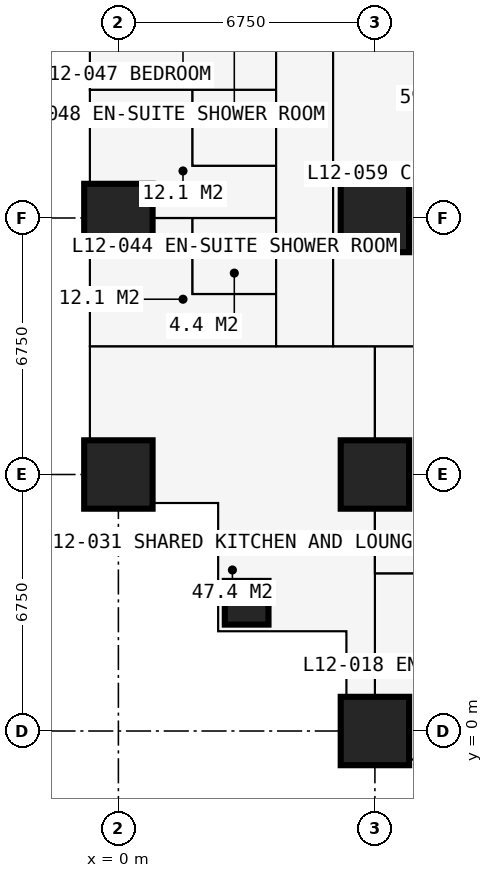
"""IFC4 building model, lengths in metres.
Left out: names, types, materials, properties, quantities, classifications, styles, units other than length and angle.
Written with IfcOpenShell. Run it as: python <this file> out.ifc"""

import sys

from ifc_helpers import new_model, si_unit, direction, frame, frame_2d, origin, origin_2d, place, context, subcontext, project, spatial, rectangle, extrude, element, fill, save


model = new_model("IFC4")
c1 = context("Model", 3, precision=1e-05, world=origin(), true_north=direction((0.0, 1.0)))
c2 = subcontext(c1, "Body", "Model", "MODEL_VIEW")
j1 = project(units=[si_unit("LENGTHUNIT", "METRE"), si_unit("PLANEANGLEUNIT", "RADIAN")], contexts=[c1])
p1 = place(None, origin())
s1 = spatial("IfcSite", under=j1, at=p1, CompositionType="ELEMENT")
p2 = place(p1, origin())
s2 = spatial("IfcBuilding", under=s1, at=p2, CompositionType="ELEMENT")
p3 = place(p2, frame((0.0, 0.0, 46.8)))
s3 = spatial("IfcBuildingStorey", under=s2, at=p3, CompositionType="ELEMENT", Elevation=46.8)
for number, where, z_axis, x_axis in (
    (1, (0.0, 6.75, 0.0), (0.0, 0.0, 1.0), (1.0, 0.0, 0.0)),
    (2, (0.0, 13.5, 0.0), (0.0, 0.0, 1.0), (1.0, 0.0, 0.0)),
):
    element("IfcColumn", number, at=place(p3, frame(where, z_axis=z_axis, x_axis=x_axis)), inside=s3, PredefinedType="COLUMN", context=c2, shape_type="SweptSolid", body=[
        extrude(rectangle(XDim=1.8, YDim=1.8, at=origin_2d()), origin(), (0.0, 0.0, 1.0), 3.6),
    ])
p4 = place(p3, frame((3.375, 3.375, 0.0), z_axis=(0.0, 0.0, 1.0), x_axis=(1.0, 0.0, 0.0)))
e3 = element("IfcColumn", 3, at=p4, inside=s3, PredefinedType="COLUMN", context=c2, shape_type="SweptSolid", body=[
    extrude(rectangle(XDim=1.15, YDim=1.15, at=origin_2d()), origin(), (0.0, 0.0, 1.0), 3.6),
])
for number, where, z_axis, x_axis in (
    (4, (6.75, 0.0, 0.0), (0.0, 0.0, 1.0), (1.0, 0.0, 0.0)),
    (5, (6.75, 6.75, 0.0), (0.0, 0.0, 1.0), (1.0, 0.0, 0.0)),
    (6, (6.75, 13.5, 0.0), (0.0, 0.0, 1.0), (1.0, 0.0, 0.0)),
):
    element("IfcColumn", number, at=place(p3, frame(where, z_axis=z_axis, x_axis=x_axis)), inside=s3, PredefinedType="COLUMN", context=c2, shape_type="SweptSolid", body=[
        extrude(rectangle(XDim=1.8, YDim=1.8, at=origin_2d()), origin(), (0.0, 0.0, 1.0), 3.6),
    ])
p5 = place(p3, frame((-0.75, 13.5, 0.0), z_axis=(0.0, 0.0, 1.0), x_axis=(0.0, 1.0, 0.0)))
e7 = element("IfcWall", 7, at=p5, inside=s3, PredefinedType="SOLIDWALL", context=c2, shape_type="SweptSolid", body=[
    extrude(rectangle(XDim=6.75, YDim=0.15, at=frame_2d((3.375, 0.0))), origin(), (0.0, 0.0, 1.0), 3.375),
])
p6 = place(p5, frame((0.962, 0.0, 0.0)))
e8 = element("IfcOpeningElement", 8, at=p6, cuts=e7, PredefinedType="OPENING", context=c2, shape_type="SweptSolid", body=[
    extrude(rectangle(XDim=1.0, YDim=2.2, at=frame_2d((0.5, 1.1))), frame((0.0, 0.085, 0.0), z_axis=(0.0, -1.0, 0.0), x_axis=(1.0, 0.0, 0.0)), (0.0, 0.0, 1.0), 0.17),
])
p7 = place(p5, frame((2.025, 0.0, 0.9)))
e9 = element("IfcOpeningElement", 9, at=p7, cuts=e7, PredefinedType="OPENING", context=c2, shape_type="SweptSolid", body=[
    extrude(rectangle(XDim=1.2, YDim=1.8, at=frame_2d((0.6, 0.9))), frame((0.0, 0.085, 0.0), z_axis=(0.0, -1.0, 0.0), x_axis=(1.0, 0.0, 0.0)), (0.0, 0.0, 1.0), 0.17),
])
p8 = place(p5, frame((4.788, 0.0, 0.0)))
e10 = element("IfcOpeningElement", 10, at=p8, cuts=e7, PredefinedType="OPENING", context=c2, shape_type="SweptSolid", body=[
    extrude(rectangle(XDim=1.0, YDim=2.2, at=frame_2d((0.5, 1.1))), frame((0.0, 0.085, 0.0), z_axis=(0.0, -1.0, 0.0), x_axis=(1.0, 0.0, 0.0)), (0.0, 0.0, 1.0), 0.17),
])
p9 = place(p5, frame((3.525, 0.0, 0.9)))
e11 = element("IfcOpeningElement", 11, at=p9, cuts=e7, PredefinedType="OPENING", context=c2, shape_type="SweptSolid", body=[
    extrude(rectangle(XDim=1.2, YDim=1.8, at=frame_2d((0.6, 0.9))), frame((0.0, 0.085, 0.0), z_axis=(0.0, -1.0, 0.0), x_axis=(1.0, 0.0, 0.0)), (0.0, 0.0, 1.0), 0.17),
])
p10 = place(p3, frame((-0.75, 6.0, 0.0), z_axis=(0.0, 0.0, 1.0), x_axis=(1.0, 0.0, 0.0)))
e12 = element("IfcWall", 12, at=p10, inside=s3, PredefinedType="SOLIDWALL", context=c2, shape_type="SweptSolid", body=[
    extrude(rectangle(XDim=3.375, YDim=0.3, at=frame_2d((1.688, 0.0))), origin(), (0.0, 0.0, 1.0), 3.375),
])
p11 = place(p10, frame((1.833, 0.0, 0.9)))
e13 = element("IfcOpeningElement", 13, at=p11, cuts=e12, PredefinedType="OPENING", context=c2, shape_type="SweptSolid", body=[
    extrude(rectangle(XDim=1.2, YDim=1.8, at=frame_2d((0.6, 0.9))), frame((0.0, 0.16, 0.0), z_axis=(0.0, -1.0, 0.0), x_axis=(1.0, 0.0, 0.0)), (0.0, 0.0, 1.0), 0.32),
])
p12 = place(p3, frame((2.625, 6.0, 0.0), z_axis=(0.0, 0.0, 1.0), x_axis=(0.0, -1.0, 0.0)))
e14 = element("IfcWall", 14, at=p12, inside=s3, PredefinedType="SOLIDWALL", context=c2, shape_type="SweptSolid", body=[
    extrude(rectangle(XDim=3.375, YDim=0.3, at=frame_2d((1.688, 0.0))), origin(), (0.0, 0.0, 1.0), 3.375),
])
p13 = place(p12, frame((0.788, 0.0, 0.6)))
e15 = element("IfcOpeningElement", 15, at=p13, cuts=e14, PredefinedType="OPENING", context=c2, shape_type="SweptSolid", body=[
    extrude(rectangle(XDim=1.8, YDim=2.1, at=frame_2d((0.9, 1.05))), frame((0.0, 0.16, 0.0), z_axis=(0.0, -1.0, 0.0), x_axis=(1.0, 0.0, 0.0)), (0.0, 0.0, 1.0), 0.32),
])
p14 = place(p3, frame((2.625, 2.625, 0.0), z_axis=(0.0, 0.0, 1.0), x_axis=(1.0, 0.0, 0.0)))
e16 = element("IfcWall", 16, at=p14, inside=s3, PredefinedType="SOLIDWALL", context=c2, shape_type="SweptSolid", body=[
    extrude(rectangle(XDim=3.375, YDim=0.3, at=frame_2d((1.688, 0.0))), origin(), (0.0, 0.0, 1.0), 3.375),
])
p15 = place(p14, frame((0.788, 0.0, 0.6)))
e17 = element("IfcOpeningElement", 17, at=p15, cuts=e16, PredefinedType="OPENING", context=c2, shape_type="SweptSolid", body=[
    extrude(rectangle(XDim=1.8, YDim=2.1, at=frame_2d((0.9, 1.05))), frame((0.0, 0.16, 0.0), z_axis=(0.0, -1.0, 0.0), x_axis=(1.0, 0.0, 0.0)), (0.0, 0.0, 1.0), 0.32),
])
p16 = place(p3, frame((6.0, 2.625, 0.0), z_axis=(0.0, 0.0, 1.0), x_axis=(0.0, -1.0, 0.0)))
e18 = element("IfcWall", 18, at=p16, inside=s3, PredefinedType="SOLIDWALL", context=c2, shape_type="SweptSolid", body=[
    extrude(rectangle(XDim=3.375, YDim=0.3, at=frame_2d((1.688, 0.0))), origin(), (0.0, 0.0, 1.0), 3.375),
])
p17 = place(p16, frame((0.343, 0.0, 0.9)))
e19 = element("IfcOpeningElement", 19, at=p17, cuts=e18, PredefinedType="OPENING", context=c2, shape_type="SweptSolid", body=[
    extrude(rectangle(XDim=1.2, YDim=1.8, at=frame_2d((0.6, 0.9))), frame((0.0, 0.16, 0.0), z_axis=(0.0, -1.0, 0.0), x_axis=(1.0, 0.0, 0.0)), (0.0, 0.0, 1.0), 0.32),
])
p18 = place(p3, frame((-0.85, 16.875, 0.0), z_axis=(0.0, 0.0, 1.0), x_axis=(-1.0, 0.0, 0.0)))
e20 = element("IfcWall", 20, at=p18, inside=s3, PredefinedType="USERDEFINED", context=c2, shape_type="SweptSolid", body=[
    extrude(rectangle(XDim=2.2, YDim=1.0, at=frame_2d((1.1, 0.0))), origin(), (0.0, 0.0, 1.0), 0.9),
])
p19 = place(p3, frame((-0.734, 10.125, 0.0), z_axis=(0.0, 0.0, 1.0), x_axis=(1.0, 0.0, 0.0)))
e21 = element("IfcWall", 21, at=p19, inside=s3, PredefinedType="PARTITIONING", context=c2, shape_type="SweptSolid", body=[
    extrude(rectangle(XDim=10.859, YDim=0.15, at=frame_2d((5.429, 0.0))), origin(), (0.0, 0.0, 1.0), 3.375),
])
p20 = place(p19, frame((5.134, 0.0, 0.0)))
e22 = element("IfcOpeningElement", 22, at=p20, cuts=e21, PredefinedType="OPENING", context=c2, shape_type="SweptSolid", body=[
    extrude(rectangle(XDim=1.0, YDim=2.2, at=frame_2d((0.5, 1.1))), frame((0.0, 0.085, 0.0), z_axis=(0.0, -1.0, 0.0), x_axis=(1.0, 0.0, 0.0)), (0.0, 0.0, 1.0), 0.17),
])
p21 = place(p19, frame((8.234, 0.0, 0.0)))
e23 = element("IfcOpeningElement", 23, at=p21, cuts=e21, PredefinedType="OPENING", context=c2, shape_type="SweptSolid", body=[
    extrude(rectangle(XDim=0.95, YDim=2.2, at=frame_2d((0.475, 1.1))), frame((0.0, 0.085, 0.0), z_axis=(0.0, -1.0, 0.0), x_axis=(1.0, 0.0, 0.0)), (0.0, 0.0, 1.0), 0.17),
])
p22 = place(p3, frame((-0.734, 13.5, 0.0), z_axis=(0.0, 0.0, 1.0), x_axis=(1.0, 0.0, 0.0)))
e24 = element("IfcWall", 24, at=p22, inside=s3, PredefinedType="PARTITIONING", context=c2, shape_type="SweptSolid", body=[
    extrude(rectangle(XDim=4.884, YDim=0.175, at=frame_2d((2.442, 0.0))), origin(), (0.0, 0.0, 1.0), 2.877),
])
p23 = place(p3, frame((-0.734, 16.875, 0.0), z_axis=(0.0, 0.0, 1.0), x_axis=(1.0, 0.0, 0.0)))
e25 = element("IfcWall", 25, at=p23, inside=s3, PredefinedType="PARTITIONING", context=c2, shape_type="SweptSolid", body=[
    extrude(rectangle(XDim=4.884, YDim=0.175, at=frame_2d((2.442, 0.0))), origin(), (0.0, 0.0, 1.0), 3.375),
])
p24 = place(p3, frame((1.95, 11.5, 0.0), z_axis=(0.0, 0.0, 1.0), x_axis=(0.0, 1.0, 0.0)))
e26 = element("IfcWall", 26, at=p24, inside=s3, PredefinedType="PARTITIONING", context=c2, shape_type="SweptSolid", body=[
    extrude(rectangle(XDim=2.0, YDim=0.1, at=frame_2d((1.0, 0.0))), origin(), (0.0, 0.0, 1.0), 3.375),
])
p25 = place(p3, frame((1.95, 11.5, 0.0), z_axis=(0.0, 0.0, 1.0), x_axis=(1.0, 0.0, 0.0)))
e27 = element("IfcWall", 27, at=p25, inside=s3, PredefinedType="PARTITIONING", context=c2, shape_type="SweptSolid", body=[
    extrude(rectangle(XDim=2.2, YDim=0.1, at=frame_2d((1.1, 0.0))), origin(), (0.0, 0.0, 1.0), 3.375),
])
p26 = place(p25, frame((0.65, 0.0, 0.0)))
e28 = element("IfcOpeningElement", 28, at=p26, cuts=e27, PredefinedType="OPENING", context=c2, shape_type="SweptSolid", body=[
    extrude(rectangle(XDim=0.9, YDim=2.2, at=frame_2d((0.45, 1.1))), frame((0.0, 0.06, 0.0), z_axis=(0.0, -1.0, 0.0), x_axis=(1.0, 0.0, 0.0)), (0.0, 0.0, 1.0), 0.12),
])
p27 = place(p3, frame((1.95, 14.875, 0.0), z_axis=(0.0, 0.0, 1.0), x_axis=(0.0, 1.0, 0.0)))
e29 = element("IfcWall", 29, at=p27, inside=s3, PredefinedType="PARTITIONING", context=c2, shape_type="SweptSolid", body=[
    extrude(rectangle(XDim=2.0, YDim=0.1, at=frame_2d((1.0, 0.0))), origin(), (0.0, 0.0, 1.0), 3.375),
])
p28 = place(p3, frame((1.95, 14.875, 0.0), z_axis=(0.0, 0.0, 1.0), x_axis=(1.0, 0.0, 0.0)))
e30 = element("IfcWall", 30, at=p28, inside=s3, PredefinedType="PARTITIONING", context=c2, shape_type="SweptSolid", body=[
    extrude(rectangle(XDim=2.2, YDim=0.1, at=frame_2d((1.1, 0.0))), origin(), (0.0, 0.0, 1.0), 3.375),
])
p29 = place(p28, frame((0.65, 0.0, 0.0)))
e31 = element("IfcOpeningElement", 31, at=p29, cuts=e30, PredefinedType="OPENING", context=c2, shape_type="SweptSolid", body=[
    extrude(rectangle(XDim=0.9, YDim=2.2, at=frame_2d((0.45, 1.1))), frame((0.0, 0.06, 0.0), z_axis=(0.0, -1.0, 0.0), x_axis=(1.0, 0.0, 0.0)), (0.0, 0.0, 1.0), 0.12),
])
p30 = place(p3, frame((4.15, 10.125, 0.0), z_axis=(0.0, 0.0, 1.0), x_axis=(0.0, 1.0, 0.0)))
e32 = element("IfcWall", 32, at=p30, inside=s3, PredefinedType="PARTITIONING", context=c2, shape_type="SweptSolid", body=[
    extrude(rectangle(XDim=23.625, YDim=0.1, at=frame_2d((11.812, 0.0))), origin(), (0.0, 0.0, 1.0), 3.375),
])
p31 = place(p30, frame((0.2, 0.0, 0.0)))
e33 = element("IfcOpeningElement", 33, at=p31, cuts=e32, PredefinedType="OPENING", context=c2, shape_type="SweptSolid", body=[
    extrude(rectangle(XDim=0.95, YDim=2.2, at=frame_2d((0.475, 1.1))), frame((0.0, 0.06, 0.0), z_axis=(0.0, -1.0, 0.0), x_axis=(1.0, 0.0, 0.0)), (0.0, 0.0, 1.0), 0.12),
])
p32 = place(p30, frame((3.625, 0.0, 0.0)))
e34 = element("IfcOpeningElement", 34, at=p32, cuts=e32, PredefinedType="OPENING", context=c2, shape_type="SweptSolid", body=[
    extrude(rectangle(XDim=0.95, YDim=2.2, at=frame_2d((0.475, 1.1))), frame((0.0, 0.06, 0.0), z_axis=(0.0, -1.0, 0.0), x_axis=(1.0, 0.0, 0.0)), (0.0, 0.0, 1.0), 0.12),
])
p33 = place(p30, frame((7.0, 0.0, 0.0)))
e35 = element("IfcOpeningElement", 35, at=p33, cuts=e32, PredefinedType="OPENING", context=c2, shape_type="SweptSolid", body=[
    extrude(rectangle(XDim=0.95, YDim=2.2, at=frame_2d((0.475, 1.1))), frame((0.0, 0.06, 0.0), z_axis=(0.0, -1.0, 0.0), x_axis=(1.0, 0.0, 0.0)), (0.0, 0.0, 1.0), 0.12),
])
p34 = place(p30, frame((10.375, 0.0, 0.0)))
e36 = element("IfcOpeningElement", 36, at=p34, cuts=e32, PredefinedType="OPENING", context=c2, shape_type="SweptSolid", body=[
    extrude(rectangle(XDim=0.95, YDim=2.2, at=frame_2d((0.475, 1.1))), frame((0.0, 0.06, 0.0), z_axis=(0.0, -1.0, 0.0), x_axis=(1.0, 0.0, 0.0)), (0.0, 0.0, 1.0), 0.12),
])
p35 = place(p30, frame((13.75, 0.0, 0.0)))
e37 = element("IfcOpeningElement", 37, at=p35, cuts=e32, PredefinedType="OPENING", context=c2, shape_type="SweptSolid", body=[
    extrude(rectangle(XDim=0.95, YDim=2.2, at=frame_2d((0.475, 1.1))), frame((0.0, 0.06, 0.0), z_axis=(0.0, -1.0, 0.0), x_axis=(1.0, 0.0, 0.0)), (0.0, 0.0, 1.0), 0.12),
])
p36 = place(p30, frame((17.125, 0.0, 0.0)))
e38 = element("IfcOpeningElement", 38, at=p36, cuts=e32, PredefinedType="OPENING", context=c2, shape_type="SweptSolid", body=[
    extrude(rectangle(XDim=0.95, YDim=2.2, at=frame_2d((0.475, 1.1))), frame((0.0, 0.06, 0.0), z_axis=(0.0, -1.0, 0.0), x_axis=(1.0, 0.0, 0.0)), (0.0, 0.0, 1.0), 0.12),
])
p37 = place(p30, frame((20.5, 0.0, 0.0)))
e39 = element("IfcOpeningElement", 39, at=p37, cuts=e32, PredefinedType="OPENING", context=c2, shape_type="SweptSolid", body=[
    extrude(rectangle(XDim=0.95, YDim=2.2, at=frame_2d((0.475, 1.1))), frame((0.0, 0.06, 0.0), z_axis=(0.0, -1.0, 0.0), x_axis=(1.0, 0.0, 0.0)), (0.0, 0.0, 1.0), 0.12),
])
p38 = place(p3, frame((5.65, 10.125, 0.0), z_axis=(0.0, 0.0, 1.0), x_axis=(0.0, 1.0, 0.0)))
e40 = element("IfcWall", 40, at=p38, inside=s3, PredefinedType="PARTITIONING", context=c2, shape_type="SweptSolid", body=[
    extrude(rectangle(XDim=10.762, YDim=0.15, at=frame_2d((5.381, 0.0))), origin(), (0.0, 0.0, 1.0), 3.375),
])
p39 = place(p3, frame((6.75, -0.734, 0.0), z_axis=(0.0, 0.0, 1.0), x_axis=(0.0, 1.0, 0.0)))
e41 = element("IfcWall", 41, at=p39, inside=s3, PredefinedType="PARTITIONING", context=c2, shape_type="SweptSolid", body=[
    extrude(rectangle(XDim=10.859, YDim=0.15, at=frame_2d((5.429, 0.0))), origin(), (0.0, 0.0, 1.0), 2.877),
])
p40 = place(p3, frame((6.75, 4.15, 0.0), z_axis=(0.0, 0.0, 1.0), x_axis=(1.0, 0.0, 0.0)))
e42 = element("IfcWall", 42, at=p40, inside=s3, PredefinedType="PARTITIONING", context=c2, shape_type="SweptSolid", body=[
    extrude(rectangle(XDim=23.625, YDim=0.1, at=frame_2d((11.812, 0.0))), origin(), (0.0, 0.0, 1.0), 3.375),
])
p41 = place(p40, frame((0.2, 0.0, 0.0)))
e43 = element("IfcOpeningElement", 43, at=p41, cuts=e42, PredefinedType="OPENING", context=c2, shape_type="SweptSolid", body=[
    extrude(rectangle(XDim=0.95, YDim=2.2, at=frame_2d((0.475, 1.1))), frame((0.0, 0.06, 0.0), z_axis=(0.0, -1.0, 0.0), x_axis=(1.0, 0.0, 0.0)), (0.0, 0.0, 1.0), 0.12),
])
p42 = place(p40, frame((3.625, 0.0, 0.0)))
e44 = element("IfcOpeningElement", 44, at=p42, cuts=e42, PredefinedType="OPENING", context=c2, shape_type="SweptSolid", body=[
    extrude(rectangle(XDim=0.95, YDim=2.2, at=frame_2d((0.475, 1.1))), frame((0.0, 0.06, 0.0), z_axis=(0.0, -1.0, 0.0), x_axis=(1.0, 0.0, 0.0)), (0.0, 0.0, 1.0), 0.12),
])
p43 = place(p40, frame((7.0, 0.0, 0.0)))
e45 = element("IfcOpeningElement", 45, at=p43, cuts=e42, PredefinedType="OPENING", context=c2, shape_type="SweptSolid", body=[
    extrude(rectangle(XDim=0.95, YDim=2.2, at=frame_2d((0.475, 1.1))), frame((0.0, 0.06, 0.0), z_axis=(0.0, -1.0, 0.0), x_axis=(1.0, 0.0, 0.0)), (0.0, 0.0, 1.0), 0.12),
])
p44 = place(p40, frame((10.375, 0.0, 0.0)))
e46 = element("IfcOpeningElement", 46, at=p44, cuts=e42, PredefinedType="OPENING", context=c2, shape_type="SweptSolid", body=[
    extrude(rectangle(XDim=0.95, YDim=2.2, at=frame_2d((0.475, 1.1))), frame((0.0, 0.06, 0.0), z_axis=(0.0, -1.0, 0.0), x_axis=(1.0, 0.0, 0.0)), (0.0, 0.0, 1.0), 0.12),
])
p45 = place(p40, frame((13.75, 0.0, 0.0)))
e47 = element("IfcOpeningElement", 47, at=p45, cuts=e42, PredefinedType="OPENING", context=c2, shape_type="SweptSolid", body=[
    extrude(rectangle(XDim=0.95, YDim=2.2, at=frame_2d((0.475, 1.1))), frame((0.0, 0.06, 0.0), z_axis=(0.0, -1.0, 0.0), x_axis=(1.0, 0.0, 0.0)), (0.0, 0.0, 1.0), 0.12),
])
p46 = place(p40, frame((17.125, 0.0, 0.0)))
e48 = element("IfcOpeningElement", 48, at=p46, cuts=e42, PredefinedType="OPENING", context=c2, shape_type="SweptSolid", body=[
    extrude(rectangle(XDim=0.95, YDim=2.2, at=frame_2d((0.475, 1.1))), frame((0.0, 0.06, 0.0), z_axis=(0.0, -1.0, 0.0), x_axis=(1.0, 0.0, 0.0)), (0.0, 0.0, 1.0), 0.12),
])
p47 = place(p40, frame((20.5, 0.0, 0.0)))
e49 = element("IfcOpeningElement", 49, at=p47, cuts=e42, PredefinedType="OPENING", context=c2, shape_type="SweptSolid", body=[
    extrude(rectangle(XDim=0.95, YDim=2.2, at=frame_2d((0.475, 1.1))), frame((0.0, 0.06, 0.0), z_axis=(0.0, -1.0, 0.0), x_axis=(1.0, 0.0, 0.0)), (0.0, 0.0, 1.0), 0.12),
])
p48 = place(p6, origin())
e50 = element("IfcDoor", 50, at=p48, inside=s3, OperationType="SINGLE_SWING_LEFT", PredefinedType="DOOR", context=c2, shape_type="SweptSolid", body=[
    extrude(rectangle(XDim=1.0, YDim=2.2, at=frame_2d((0.5, 1.1))), frame((0.0, 0.025, 0.0), z_axis=(0.0, -1.0, 0.0), x_axis=(1.0, 0.0, 0.0)), (0.0, 0.0, 1.0), 0.05),
])
fill(e8, e50)
p49 = place(p7, origin())
e51 = element("IfcWindow", 51, at=p49, inside=s3, PartitioningType="SINGLE_PANEL", PredefinedType="WINDOW", context=c2, shape_type="SweptSolid", body=[
    extrude(rectangle(XDim=1.2, YDim=1.8, at=frame_2d((0.6, 0.9))), frame((0.0, 0.03, 0.0), z_axis=(0.0, -1.0, 0.0), x_axis=(1.0, 0.0, 0.0)), (0.0, 0.0, 1.0), 0.06),
])
fill(e9, e51)
p50 = place(p9, origin())
e52 = element("IfcWindow", 52, at=p50, inside=s3, PartitioningType="SINGLE_PANEL", PredefinedType="WINDOW", context=c2, shape_type="SweptSolid", body=[
    extrude(rectangle(XDim=1.2, YDim=1.8, at=frame_2d((0.6, 0.9))), frame((0.0, 0.03, 0.0), z_axis=(0.0, -1.0, 0.0), x_axis=(1.0, 0.0, 0.0)), (0.0, 0.0, 1.0), 0.06),
])
fill(e11, e52)
p51 = place(p11, origin())
e53 = element("IfcWindow", 53, at=p51, inside=s3, PartitioningType="SINGLE_PANEL", PredefinedType="WINDOW", context=c2, shape_type="SweptSolid", body=[
    extrude(rectangle(XDim=1.2, YDim=1.8, at=frame_2d((0.6, 0.9))), frame((0.0, 0.03, 0.0), z_axis=(0.0, -1.0, 0.0), x_axis=(1.0, 0.0, 0.0)), (0.0, 0.0, 1.0), 0.06),
])
fill(e13, e53)
p52 = place(p13, origin())
e54 = element("IfcWindow", 54, at=p52, inside=s3, PartitioningType="SINGLE_PANEL", PredefinedType="WINDOW", context=c2, shape_type="SweptSolid", body=[
    extrude(rectangle(XDim=1.8, YDim=2.1, at=frame_2d((0.9, 1.05))), frame((0.0, 0.03, 0.0), z_axis=(0.0, -1.0, 0.0), x_axis=(1.0, 0.0, 0.0)), (0.0, 0.0, 1.0), 0.06),
])
fill(e15, e54)
p53 = place(p15, origin())
e55 = element("IfcWindow", 55, at=p53, inside=s3, PartitioningType="SINGLE_PANEL", PredefinedType="WINDOW", context=c2, shape_type="SweptSolid", body=[
    extrude(rectangle(XDim=1.8, YDim=2.1, at=frame_2d((0.9, 1.05))), frame((0.0, 0.03, 0.0), z_axis=(0.0, -1.0, 0.0), x_axis=(1.0, 0.0, 0.0)), (0.0, 0.0, 1.0), 0.06),
])
fill(e17, e55)
p54 = place(p17, origin())
e56 = element("IfcWindow", 56, at=p54, inside=s3, PartitioningType="SINGLE_PANEL", PredefinedType="WINDOW", context=c2, shape_type="SweptSolid", body=[
    extrude(rectangle(XDim=1.2, YDim=1.8, at=frame_2d((0.6, 0.9))), frame((0.0, 0.03, 0.0), z_axis=(0.0, -1.0, 0.0), x_axis=(1.0, 0.0, 0.0)), (0.0, 0.0, 1.0), 0.06),
])
fill(e19, e56)
p55 = place(p41, origin())
e57 = element("IfcDoor", 57, at=p55, inside=s3, OperationType="SINGLE_SWING_LEFT", PredefinedType="DOOR", context=c2, shape_type="SweptSolid", body=[
    extrude(rectangle(XDim=0.95, YDim=2.2, at=frame_2d((0.475, 1.1))), frame((0.0, 0.025, 0.0), z_axis=(0.0, -1.0, 0.0), x_axis=(1.0, 0.0, 0.0)), (0.0, 0.0, 1.0), 0.05),
])
fill(e43, e57)
p56 = place(p20, origin())
e58 = element("IfcDoor", 58, at=p56, inside=s3, OperationType="SINGLE_SWING_LEFT", PredefinedType="DOOR", context=c2, shape_type="SweptSolid", body=[
    extrude(rectangle(XDim=1.0, YDim=2.2, at=frame_2d((0.5, 1.1))), frame((0.0, 0.025, 0.0), z_axis=(0.0, -1.0, 0.0), x_axis=(1.0, 0.0, 0.0)), (0.0, 0.0, 1.0), 0.05),
])
fill(e22, e58)
p57 = place(p31, origin())
e59 = element("IfcDoor", 59, at=p57, inside=s3, OperationType="SINGLE_SWING_LEFT", PredefinedType="DOOR", context=c2, shape_type="SweptSolid", body=[
    extrude(rectangle(XDim=0.95, YDim=2.2, at=frame_2d((0.475, 1.1))), frame((0.0, 0.025, 0.0), z_axis=(0.0, -1.0, 0.0), x_axis=(1.0, 0.0, 0.0)), (0.0, 0.0, 1.0), 0.05),
])
fill(e33, e59)
p58 = place(p26, origin())
e60 = element("IfcDoor", 60, at=p58, inside=s3, OperationType="SINGLE_SWING_RIGHT", PredefinedType="DOOR", context=c2, shape_type="SweptSolid", body=[
    extrude(rectangle(XDim=0.9, YDim=2.2, at=frame_2d((0.45, 1.1))), frame((0.0, 0.025, 0.0), z_axis=(0.0, -1.0, 0.0), x_axis=(1.0, 0.0, 0.0)), (0.0, 0.0, 1.0), 0.05),
])
fill(e28, e60)
p59 = place(p32, origin())
e61 = element("IfcDoor", 61, at=p59, inside=s3, OperationType="SINGLE_SWING_LEFT", PredefinedType="DOOR", context=c2, shape_type="SweptSolid", body=[
    extrude(rectangle(XDim=0.95, YDim=2.2, at=frame_2d((0.475, 1.1))), frame((0.0, 0.025, 0.0), z_axis=(0.0, -1.0, 0.0), x_axis=(1.0, 0.0, 0.0)), (0.0, 0.0, 1.0), 0.05),
])
fill(e34, e61)
p60 = place(p29, origin())
e62 = element("IfcDoor", 62, at=p60, inside=s3, OperationType="SINGLE_SWING_RIGHT", PredefinedType="DOOR", context=c2, shape_type="SweptSolid", body=[
    extrude(rectangle(XDim=0.9, YDim=2.2, at=frame_2d((0.45, 1.1))), frame((0.0, 0.025, 0.0), z_axis=(0.0, -1.0, 0.0), x_axis=(1.0, 0.0, 0.0)), (0.0, 0.0, 1.0), 0.05),
])
fill(e31, e62)
p61 = place(p33, origin())
e63 = element("IfcDoor", 63, at=p61, inside=s3, OperationType="SINGLE_SWING_LEFT", PredefinedType="DOOR", context=c2, shape_type="SweptSolid", body=[
    extrude(rectangle(XDim=0.95, YDim=2.2, at=frame_2d((0.475, 1.1))), frame((0.0, 0.025, 0.0), z_axis=(0.0, -1.0, 0.0), x_axis=(1.0, 0.0, 0.0)), (0.0, 0.0, 1.0), 0.05),
])
fill(e35, e63)
p62 = place(p21, origin())
e64 = element("IfcDoor", 64, at=p62, inside=s3, OperationType="SINGLE_SWING_LEFT", PredefinedType="DOOR", context=c2, shape_type="SweptSolid", body=[
    extrude(rectangle(XDim=0.95, YDim=2.2, at=frame_2d((0.475, 1.1))), frame((0.0, 0.025, 0.0), z_axis=(0.0, -1.0, 0.0), x_axis=(1.0, 0.0, 0.0)), (0.0, 0.0, 1.0), 0.05),
])
fill(e23, e64)
save(model, sys.argv[1])
